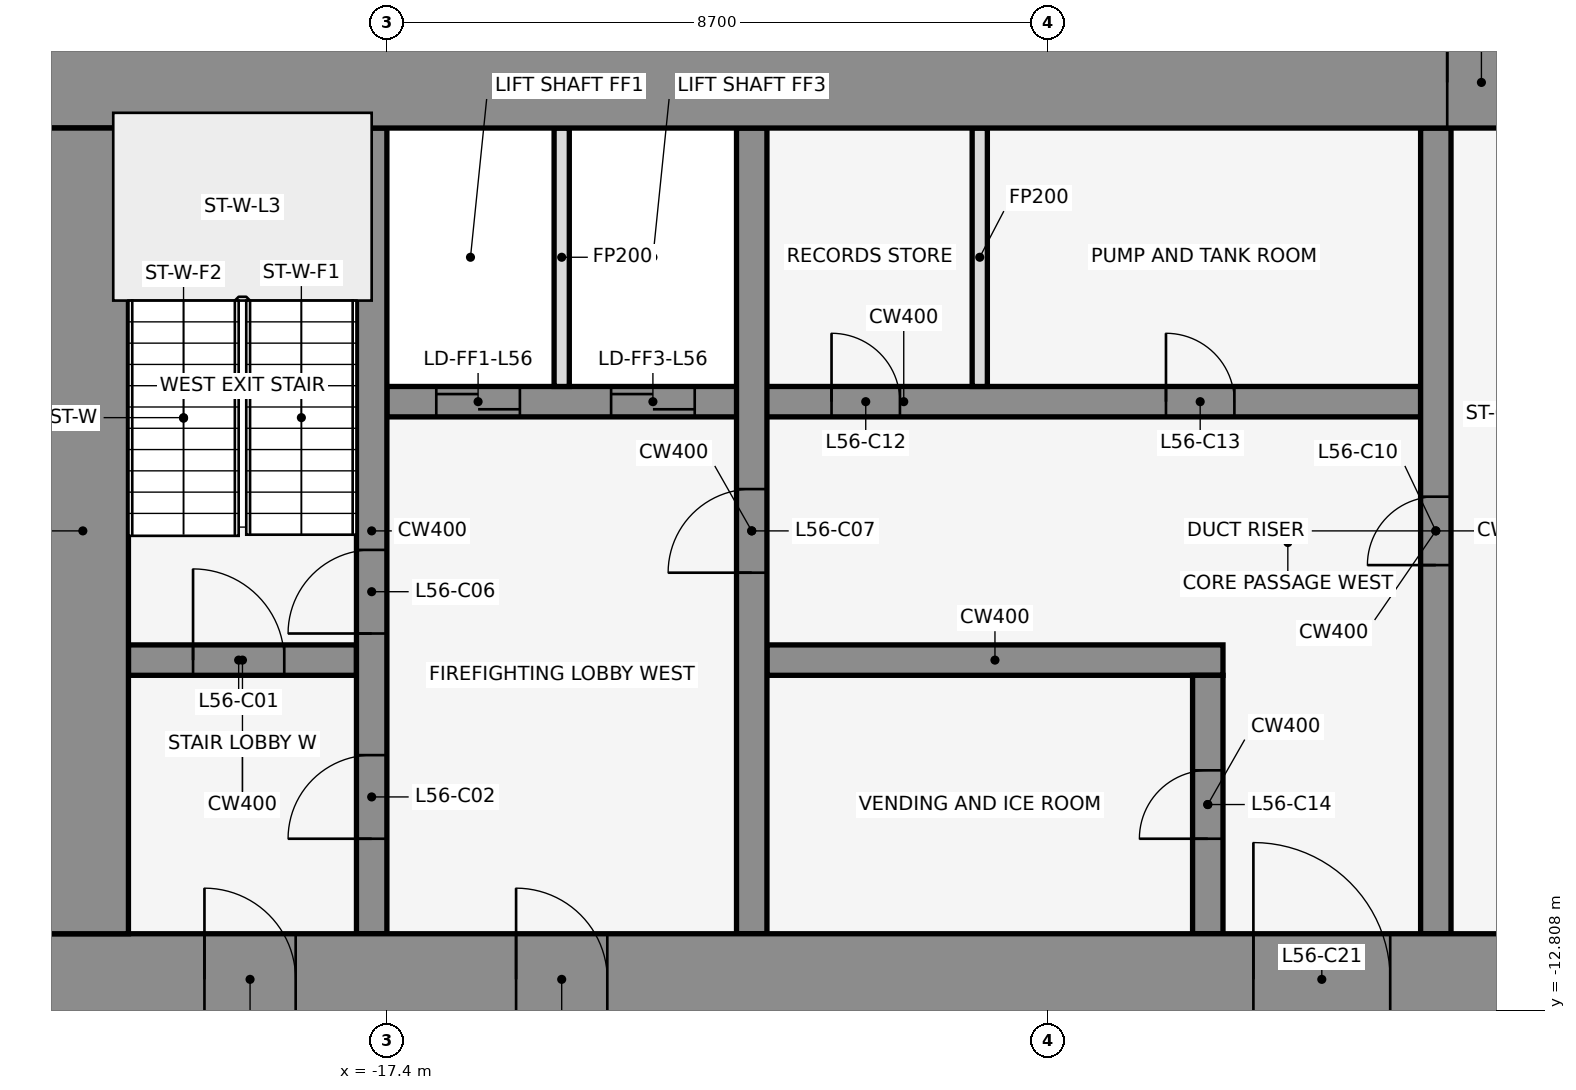
"""IFC4 building model, lengths in metres.
Left out: names, types, materials, properties, quantities, classifications, styles, units other than length and angle.
Written with IfcOpenShell. Run it as: python <this file> out.ifc"""

import sys

from ifc_helpers import new_model, si_unit, direction, frame, frame_2d, origin, place, context, subcontext, project, spatial, rectangle, extrude, element, fill, save


model = new_model("IFC4")
c1 = context("Model", 3, precision=1e-05, world=origin(), true_north=direction((0.0, 1.0)))
c2 = subcontext(c1, "Body", "Model", "MODEL_VIEW")
j1 = project(units=[si_unit("LENGTHUNIT", "METRE"), si_unit("PLANEANGLEUNIT", "RADIAN")], contexts=[c1])
p1 = place(None, origin())
s1 = spatial("IfcSite", under=j1, at=p1, CompositionType="ELEMENT")
p2 = place(p1, origin())
s2 = spatial("IfcBuilding", under=s1, at=p2, CompositionType="ELEMENT")
p3 = place(p2, frame((0.0, 0.0, 249.8)))
s3 = spatial("IfcBuildingStorey", under=s2, at=p3, CompositionType="ELEMENT", Elevation=249.8)
p4 = place(p3, frame((-14.599, 1.08, 0.0), z_axis=(0.0, 0.0, 1.0), x_axis=(-0.83981312244, -0.542875602121, 0.0)))
e1 = element("IfcWall", 1, at=p4, inside=s3, PredefinedType="STANDARD", context=c2, shape_type="SweptSolid", body=[
    extrude(rectangle(XDim=2.183, YDim=0.25, at=frame_2d((1.091, 0.0))), origin(), (0.0, 0.0, 1.0), 4.05),
])
p5 = place(p3, frame((-20.8, -8.2, 0.0), z_axis=(0.0, 0.0, 1.0), x_axis=(1.0, 0.0, 0.0)))
e2 = element("IfcWall", 2, at=p5, inside=s3, PredefinedType="SHEAR", context=c2, shape_type="SweptSolid", body=[
    extrude(rectangle(XDim=3.0, YDim=0.4, at=frame_2d((1.5, 0.0))), origin(), (0.0, 0.0, 1.0), 4.2),
])
p6 = place(p5, frame((0.85, 0.0, 0.0)))
e3 = element("IfcOpeningElement", 3, at=p6, cuts=e2, PredefinedType="OPENING", context=c2, shape_type="SweptSolid", body=[
    extrude(rectangle(XDim=1.2, YDim=2.1, at=frame_2d((0.6, 1.05))), frame((0.0, 0.212, 0.0), z_axis=(0.0, -1.0, 0.0), x_axis=(1.0, 0.0, 0.0)), (0.0, 0.0, 1.0), 0.424),
])
p7 = place(p3, frame((-12.4, -8.2, 0.0), z_axis=(0.0, 0.0, 1.0), x_axis=(1.0, 0.0, 0.0)))
e4 = element("IfcWall", 4, at=p7, inside=s3, PredefinedType="SHEAR", context=c2, shape_type="SweptSolid", body=[
    extrude(rectangle(XDim=6.0, YDim=0.4, at=frame_2d((3.0, 0.0))), origin(), (0.0, 0.0, 1.0), 4.2),
])
p8 = place(p3, frame((-17.4, -4.8, 0.0), z_axis=(0.0, 0.0, 1.0), x_axis=(1.0, 0.0, 0.0)))
e5 = element("IfcWall", 5, at=p8, inside=s3, PredefinedType="SHEAR", context=c2, shape_type="SweptSolid", body=[
    extrude(rectangle(XDim=13.6, YDim=0.4, at=frame_2d((6.8, 0.0))), origin(), (0.0, 0.0, 1.0), 4.2),
])
p9 = place(p8, frame((0.65, 0.0, 0.0)))
e6 = element("IfcOpeningElement", 6, at=p9, cuts=e5, PredefinedType="OPENING", context=c2, shape_type="SweptSolid", body=[
    extrude(rectangle(XDim=1.1, YDim=2.1, at=frame_2d((0.55, 1.05))), frame((0.0, 0.212, 0.0), z_axis=(0.0, -1.0, 0.0), x_axis=(1.0, 0.0, 0.0)), (0.0, 0.0, 1.0), 0.424),
])
p10 = place(p8, frame((2.95, 0.0, 0.0)))
e7 = element("IfcOpeningElement", 7, at=p10, cuts=e5, PredefinedType="OPENING", context=c2, shape_type="SweptSolid", body=[
    extrude(rectangle(XDim=1.1, YDim=2.1, at=frame_2d((0.55, 1.05))), frame((0.0, 0.212, 0.0), z_axis=(0.0, -1.0, 0.0), x_axis=(1.0, 0.0, 0.0)), (0.0, 0.0, 1.0), 0.424),
])
p11 = place(p8, frame((5.85, 0.0, 0.0)))
e8 = element("IfcOpeningElement", 8, at=p11, cuts=e5, PredefinedType="OPENING", context=c2, shape_type="SweptSolid", body=[
    extrude(rectangle(XDim=0.9, YDim=2.1, at=frame_2d((0.45, 1.05))), frame((0.0, 0.212, 0.0), z_axis=(0.0, -1.0, 0.0), x_axis=(1.0, 0.0, 0.0)), (0.0, 0.0, 1.0), 0.424),
])
p12 = place(p8, frame((10.25, 0.0, 0.0)))
e9 = element("IfcOpeningElement", 9, at=p12, cuts=e5, PredefinedType="OPENING", context=c2, shape_type="SweptSolid", body=[
    extrude(rectangle(XDim=0.9, YDim=2.1, at=frame_2d((0.45, 1.05))), frame((0.0, 0.212, 0.0), z_axis=(0.0, -1.0, 0.0), x_axis=(1.0, 0.0, 0.0)), (0.0, 0.0, 1.0), 0.424),
])
p13 = place(p3, frame((-17.6, -11.8, 0.0), z_axis=(0.0, 0.0, 1.0), x_axis=(0.0, 1.0, 0.0)))
e10 = element("IfcWall", 10, at=p13, inside=s3, PredefinedType="SHEAR", context=c2, shape_type="SweptSolid", body=[
    extrude(rectangle(XDim=10.6, YDim=0.4, at=frame_2d((5.3, 0.0))), origin(), (0.0, 0.0, 1.0), 4.2),
])
p14 = place(p13, frame((1.25, 0.0, 0.0)))
e11 = element("IfcOpeningElement", 11, at=p14, cuts=e10, PredefinedType="OPENING", context=c2, shape_type="SweptSolid", body=[
    extrude(rectangle(XDim=1.1, YDim=2.1, at=frame_2d((0.55, 1.05))), frame((0.0, 0.212, 0.0), z_axis=(0.0, -1.0, 0.0), x_axis=(1.0, 0.0, 0.0)), (0.0, 0.0, 1.0), 0.424),
])
p15 = place(p13, frame((3.95, 0.0, 0.0)))
e12 = element("IfcOpeningElement", 12, at=p15, cuts=e10, PredefinedType="OPENING", context=c2, shape_type="SweptSolid", body=[
    extrude(rectangle(XDim=1.1, YDim=2.1, at=frame_2d((0.55, 1.05))), frame((0.0, 0.212, 0.0), z_axis=(0.0, -1.0, 0.0), x_axis=(1.0, 0.0, 0.0)), (0.0, 0.0, 1.0), 0.424),
])
p16 = place(p3, frame((-15.1, -4.6, 0.0), z_axis=(0.0, 0.0, 1.0), x_axis=(0.0, 1.0, 0.0)))
e13 = element("IfcWall", 13, at=p16, inside=s3, PredefinedType="PARTITIONING", context=c2, shape_type="SweptSolid", body=[
    extrude(rectangle(XDim=3.4, YDim=0.2, at=frame_2d((1.7, 0.0))), origin(), (0.0, 0.0, 1.0), 3.039),
])
p17 = place(p3, frame((-12.6, -11.8, 0.0), z_axis=(0.0, 0.0, 1.0), x_axis=(0.0, 1.0, 0.0)))
e14 = element("IfcWall", 14, at=p17, inside=s3, PredefinedType="SHEAR", context=c2, shape_type="SweptSolid", body=[
    extrude(rectangle(XDim=10.6, YDim=0.4, at=frame_2d((5.3, 0.0))), origin(), (0.0, 0.0, 1.0), 4.2),
])
p18 = place(p17, frame((4.75, 0.0, 0.0)))
e15 = element("IfcOpeningElement", 15, at=p18, cuts=e14, PredefinedType="OPENING", context=c2, shape_type="SweptSolid", body=[
    extrude(rectangle(XDim=1.1, YDim=2.1, at=frame_2d((0.55, 1.05))), frame((0.0, 0.212, 0.0), z_axis=(0.0, -1.0, 0.0), x_axis=(1.0, 0.0, 0.0)), (0.0, 0.0, 1.0), 0.424),
])
p19 = place(p3, frame((-9.6, -4.6, 0.0), z_axis=(0.0, 0.0, 1.0), x_axis=(0.0, 1.0, 0.0)))
e16 = element("IfcWall", 16, at=p19, inside=s3, PredefinedType="PARTITIONING", context=c2, shape_type="SweptSolid", body=[
    extrude(rectangle(XDim=3.4, YDim=0.2, at=frame_2d((1.7, 0.0))), origin(), (0.0, 0.0, 1.0), 3.039),
])
p20 = place(p3, frame((-6.6, -11.8, 0.0), z_axis=(0.0, 0.0, 1.0), x_axis=(0.0, 1.0, 0.0)))
e17 = element("IfcWall", 17, at=p20, inside=s3, PredefinedType="SHEAR", context=c2, shape_type="SweptSolid", body=[
    extrude(rectangle(XDim=3.4, YDim=0.4, at=frame_2d((1.7, 0.0))), origin(), (0.0, 0.0, 1.0), 4.2),
])
p21 = place(p20, frame((1.25, 0.0, 0.0)))
e18 = element("IfcOpeningElement", 18, at=p21, cuts=e17, PredefinedType="OPENING", context=c2, shape_type="SweptSolid", body=[
    extrude(rectangle(XDim=0.9, YDim=2.1, at=frame_2d((0.45, 1.05))), frame((0.0, 0.212, 0.0), z_axis=(0.0, -1.0, 0.0), x_axis=(1.0, 0.0, 0.0)), (0.0, 0.0, 1.0), 0.424),
])
p22 = place(p3, frame((-3.6, -11.8, 0.0), z_axis=(0.0, 0.0, 1.0), x_axis=(0.0, 1.0, 0.0)))
e19 = element("IfcWall", 19, at=p22, inside=s3, PredefinedType="SHEAR", context=c2, shape_type="SweptSolid", body=[
    extrude(rectangle(XDim=10.6, YDim=0.4, at=frame_2d((5.3, 0.0))), origin(), (0.0, 0.0, 1.0), 4.2),
])
p23 = place(p22, frame((4.85, 0.0, 0.0)))
e20 = element("IfcOpeningElement", 20, at=p23, cuts=e19, PredefinedType="OPENING", context=c2, shape_type="SweptSolid", body=[
    extrude(rectangle(XDim=0.9, YDim=2.1, at=frame_2d((0.45, 1.05))), frame((0.0, 0.212, 0.0), z_axis=(0.0, -1.0, 0.0), x_axis=(1.0, 0.0, 0.0)), (0.0, 0.0, 1.0), 0.424),
])
p24 = place(p3, frame((-22.0, -0.6, 0.0), z_axis=(0.0, 0.0, 1.0), x_axis=(1.0, 0.0, 0.0)))
e21 = element("IfcWall", 21, at=p24, inside=s3, PredefinedType="SHEAR", context=c2, shape_type="SweptSolid", body=[
    extrude(rectangle(XDim=44.0, YDim=1.2, at=frame_2d((22.0, 0.0))), origin(), (0.0, 0.0, 1.0), 4.2),
])
p25 = place(p24, frame((18.55, 0.0, 0.0)))
e22 = element("IfcOpeningElement", 22, at=p25, cuts=e21, PredefinedType="OPENING", context=c2, shape_type="SweptSolid", body=[
    extrude(rectangle(XDim=0.9, YDim=2.1, at=frame_2d((0.45, 1.05))), frame((0.0, 0.612, 0.0), z_axis=(0.0, -1.0, 0.0), x_axis=(1.0, 0.0, 0.0)), (0.0, 0.0, 1.0), 1.224),
])
p26 = place(p24, frame((24.55, 0.0, 0.0)))
e23 = element("IfcOpeningElement", 23, at=p26, cuts=e21, PredefinedType="OPENING", context=c2, shape_type="SweptSolid", body=[
    extrude(rectangle(XDim=0.9, YDim=2.1, at=frame_2d((0.45, 1.05))), frame((0.0, 0.612, 0.0), z_axis=(0.0, -1.0, 0.0), x_axis=(1.0, 0.0, 0.0)), (0.0, 0.0, 1.0), 1.224),
])
p27 = place(p3, frame((-22.0, -12.4, 0.0), z_axis=(0.0, 0.0, 1.0), x_axis=(1.0, 0.0, 0.0)))
e24 = element("IfcWall", 24, at=p27, inside=s3, PredefinedType="SHEAR", context=c2, shape_type="SweptSolid", body=[
    extrude(rectangle(XDim=44.0, YDim=1.2, at=frame_2d((22.0, 0.0))), origin(), (0.0, 0.0, 1.0), 4.2),
])
p28 = place(p27, frame((2.2, 0.0, 0.0)))
e25 = element("IfcOpeningElement", 25, at=p28, cuts=e24, PredefinedType="OPENING", context=c2, shape_type="SweptSolid", body=[
    extrude(rectangle(XDim=1.2, YDim=2.1, at=frame_2d((0.6, 1.05))), frame((0.0, 0.612, 0.0), z_axis=(0.0, -1.0, 0.0), x_axis=(1.0, 0.0, 0.0)), (0.0, 0.0, 1.0), 1.224),
])
p29 = place(p27, frame((21.4, 0.0, 0.0)))
e26 = element("IfcOpeningElement", 26, at=p29, cuts=e24, PredefinedType="OPENING", context=c2, shape_type="SweptSolid", body=[
    extrude(rectangle(XDim=1.2, YDim=2.1, at=frame_2d((0.6, 1.05))), frame((0.0, 0.612, 0.0), z_axis=(0.0, -1.0, 0.0), x_axis=(1.0, 0.0, 0.0)), (0.0, 0.0, 1.0), 1.224),
])
p30 = place(p27, frame((40.6, 0.0, 0.0)))
e27 = element("IfcOpeningElement", 27, at=p30, cuts=e24, PredefinedType="OPENING", context=c2, shape_type="SweptSolid", body=[
    extrude(rectangle(XDim=1.2, YDim=2.1, at=frame_2d((0.6, 1.05))), frame((0.0, 0.612, 0.0), z_axis=(0.0, -1.0, 0.0), x_axis=(1.0, 0.0, 0.0)), (0.0, 0.0, 1.0), 1.224),
])
p31 = place(p27, frame((16.0, 0.0, 0.0)))
e28 = element("IfcOpeningElement", 28, at=p31, cuts=e24, PredefinedType="OPENING", context=c2, shape_type="SweptSolid", body=[
    extrude(rectangle(XDim=1.8, YDim=2.1, at=frame_2d((0.9, 1.05))), frame((0.0, 0.612, 0.0), z_axis=(0.0, -1.0, 0.0), x_axis=(1.0, 0.0, 0.0)), (0.0, 0.0, 1.0), 1.224),
])
p32 = place(p27, frame((6.3, 0.0, 0.0)))
e29 = element("IfcOpeningElement", 29, at=p32, cuts=e24, PredefinedType="OPENING", context=c2, shape_type="SweptSolid", body=[
    extrude(rectangle(XDim=1.2, YDim=2.1, at=frame_2d((0.6, 1.05))), frame((0.0, 0.612, 0.0), z_axis=(0.0, -1.0, 0.0), x_axis=(1.0, 0.0, 0.0)), (0.0, 0.0, 1.0), 1.224),
])
p33 = place(p27, frame((26.2, 0.0, 0.0)))
e30 = element("IfcOpeningElement", 30, at=p33, cuts=e24, PredefinedType="OPENING", context=c2, shape_type="SweptSolid", body=[
    extrude(rectangle(XDim=1.8, YDim=2.1, at=frame_2d((0.9, 1.05))), frame((0.0, 0.612, 0.0), z_axis=(0.0, -1.0, 0.0), x_axis=(1.0, 0.0, 0.0)), (0.0, 0.0, 1.0), 1.224),
])
p34 = place(p27, frame((36.5, 0.0, 0.0)))
e31 = element("IfcOpeningElement", 31, at=p34, cuts=e24, PredefinedType="OPENING", context=c2, shape_type="SweptSolid", body=[
    extrude(rectangle(XDim=1.2, YDim=2.1, at=frame_2d((0.6, 1.05))), frame((0.0, 0.612, 0.0), z_axis=(0.0, -1.0, 0.0), x_axis=(1.0, 0.0, 0.0)), (0.0, 0.0, 1.0), 1.224),
])
p35 = place(p3, frame((-21.4, -11.8, 0.0), z_axis=(0.0, 0.0, 1.0), x_axis=(0.0, 1.0, 0.0)))
e32 = element("IfcWall", 32, at=p35, inside=s3, PredefinedType="SHEAR", context=c2, shape_type="SweptSolid", body=[
    extrude(rectangle(XDim=10.6, YDim=1.2, at=frame_2d((5.3, 0.0))), origin(), (0.0, 0.0, 1.0), 4.2),
])
p36 = place(p6, origin())
e33 = element("IfcDoor", 33, at=p36, inside=s3, OperationType="SINGLE_SWING_LEFT", PredefinedType="DOOR", context=c2, shape_type="SweptSolid", body=[
    extrude(rectangle(XDim=1.2, YDim=2.1, at=frame_2d((0.6, 1.05))), frame((0.0, 0.025, 0.0), z_axis=(0.0, -1.0, 0.0), x_axis=(1.0, 0.0, 0.0)), (0.0, 0.0, 1.0), 0.05),
])
fill(e3, e33)
p37 = place(p14, frame((1.1, 0.0, 0.0), z_axis=(0.0, 0.0, 1.0), x_axis=(-1.0, 0.0, 0.0)))
e34 = element("IfcDoor", 34, at=p37, inside=s3, OperationType="SINGLE_SWING_LEFT", PredefinedType="DOOR", context=c2, shape_type="SweptSolid", body=[
    extrude(rectangle(XDim=1.1, YDim=2.1, at=frame_2d((0.55, 1.05))), frame((0.0, 0.025, 0.0), z_axis=(0.0, -1.0, 0.0), x_axis=(1.0, 0.0, 0.0)), (0.0, 0.0, 1.0), 0.05),
])
fill(e11, e34)
p38 = place(p9, origin())
e35 = element("IfcDoor", 35, at=p38, inside=s3, OperationType="DOUBLE_DOOR_SLIDING", PredefinedType="DOOR", context=c2, shape_type="SweptSolid", body=[
    extrude(rectangle(XDim=1.1, YDim=2.1, at=frame_2d((0.55, 1.05))), frame((0.0, 0.025, 0.0), z_axis=(0.0, -1.0, 0.0), x_axis=(1.0, 0.0, 0.0)), (0.0, 0.0, 1.0), 0.05),
])
fill(e6, e35)
p39 = place(p10, origin())
e36 = element("IfcDoor", 36, at=p39, inside=s3, OperationType="DOUBLE_DOOR_SLIDING", PredefinedType="DOOR", context=c2, shape_type="SweptSolid", body=[
    extrude(rectangle(XDim=1.1, YDim=2.1, at=frame_2d((0.55, 1.05))), frame((0.0, 0.025, 0.0), z_axis=(0.0, -1.0, 0.0), x_axis=(1.0, 0.0, 0.0)), (0.0, 0.0, 1.0), 0.05),
])
fill(e7, e36)
p40 = place(p15, frame((1.1, 0.0, 0.0), z_axis=(0.0, 0.0, 1.0), x_axis=(-1.0, 0.0, 0.0)))
e37 = element("IfcDoor", 37, at=p40, inside=s3, OperationType="SINGLE_SWING_LEFT", PredefinedType="DOOR", context=c2, shape_type="SweptSolid", body=[
    extrude(rectangle(XDim=1.1, YDim=2.1, at=frame_2d((0.55, 1.05))), frame((0.0, 0.025, 0.0), z_axis=(0.0, -1.0, 0.0), x_axis=(1.0, 0.0, 0.0)), (0.0, 0.0, 1.0), 0.05),
])
fill(e12, e37)
p41 = place(p18, origin())
e38 = element("IfcDoor", 38, at=p41, inside=s3, OperationType="SINGLE_SWING_LEFT", PredefinedType="DOOR", context=c2, shape_type="SweptSolid", body=[
    extrude(rectangle(XDim=1.1, YDim=2.1, at=frame_2d((0.55, 1.05))), frame((0.0, 0.025, 0.0), z_axis=(0.0, -1.0, 0.0), x_axis=(1.0, 0.0, 0.0)), (0.0, 0.0, 1.0), 0.05),
])
fill(e15, e38)
p42 = place(p23, frame((0.9, 0.0, 0.0), z_axis=(0.0, 0.0, 1.0), x_axis=(-1.0, 0.0, 0.0)))
e39 = element("IfcDoor", 39, at=p42, inside=s3, OperationType="SINGLE_SWING_LEFT", PredefinedType="DOOR", context=c2, shape_type="SweptSolid", body=[
    extrude(rectangle(XDim=0.9, YDim=2.1, at=frame_2d((0.45, 1.05))), frame((0.0, 0.025, 0.0), z_axis=(0.0, -1.0, 0.0), x_axis=(1.0, 0.0, 0.0)), (0.0, 0.0, 1.0), 0.05),
])
fill(e20, e39)
p43 = place(p11, origin())
e40 = element("IfcDoor", 40, at=p43, inside=s3, OperationType="SINGLE_SWING_RIGHT", PredefinedType="DOOR", context=c2, shape_type="SweptSolid", body=[
    extrude(rectangle(XDim=0.9, YDim=2.1, at=frame_2d((0.45, 1.05))), frame((0.0, 0.025, 0.0), z_axis=(0.0, -1.0, 0.0), x_axis=(1.0, 0.0, 0.0)), (0.0, 0.0, 1.0), 0.05),
])
fill(e8, e40)
p44 = place(p12, origin())
e41 = element("IfcDoor", 41, at=p44, inside=s3, OperationType="SINGLE_SWING_LEFT", PredefinedType="DOOR", context=c2, shape_type="SweptSolid", body=[
    extrude(rectangle(XDim=0.9, YDim=2.1, at=frame_2d((0.45, 1.05))), frame((0.0, 0.025, 0.0), z_axis=(0.0, -1.0, 0.0), x_axis=(1.0, 0.0, 0.0)), (0.0, 0.0, 1.0), 0.05),
])
fill(e9, e41)
p45 = place(p21, origin())
e42 = element("IfcDoor", 42, at=p45, inside=s3, OperationType="SINGLE_SWING_RIGHT", PredefinedType="DOOR", context=c2, shape_type="SweptSolid", body=[
    extrude(rectangle(XDim=0.9, YDim=2.1, at=frame_2d((0.45, 1.05))), frame((0.0, 0.025, 0.0), z_axis=(0.0, -1.0, 0.0), x_axis=(1.0, 0.0, 0.0)), (0.0, 0.0, 1.0), 0.05),
])
fill(e18, e42)
p46 = place(p25, origin())
e43 = element("IfcDoor", 43, at=p46, inside=s3, OperationType="SINGLE_SWING_LEFT", PredefinedType="DOOR", context=c2, shape_type="SweptSolid", body=[
    extrude(rectangle(XDim=0.9, YDim=2.1, at=frame_2d((0.45, 1.05))), frame((0.0, 0.025, 0.0), z_axis=(0.0, -1.0, 0.0), x_axis=(1.0, 0.0, 0.0)), (0.0, 0.0, 1.0), 0.05),
])
fill(e22, e43)
p47 = place(p28, frame((1.2, 0.0, 0.0), z_axis=(0.0, 0.0, 1.0), x_axis=(-1.0, 0.0, 0.0)))
e44 = element("IfcDoor", 44, at=p47, inside=s3, OperationType="SINGLE_SWING_RIGHT", PredefinedType="DOOR", context=c2, shape_type="SweptSolid", body=[
    extrude(rectangle(XDim=1.2, YDim=2.1, at=frame_2d((0.6, 1.05))), frame((0.0, 0.025, 0.0), z_axis=(0.0, -1.0, 0.0), x_axis=(1.0, 0.0, 0.0)), (0.0, 0.0, 1.0), 0.05),
])
fill(e25, e44)
p48 = place(p31, origin())
e45 = element("IfcDoor", 45, at=p48, inside=s3, OperationType="SINGLE_SWING_LEFT", PredefinedType="DOOR", context=c2, shape_type="SweptSolid", body=[
    extrude(rectangle(XDim=1.8, YDim=2.1, at=frame_2d((0.9, 1.05))), frame((0.0, 0.025, 0.0), z_axis=(0.0, -1.0, 0.0), x_axis=(1.0, 0.0, 0.0)), (0.0, 0.0, 1.0), 0.05),
])
fill(e28, e45)
p49 = place(p32, frame((1.2, 0.0, 0.0), z_axis=(0.0, 0.0, 1.0), x_axis=(-1.0, 0.0, 0.0)))
e46 = element("IfcDoor", 46, at=p49, inside=s3, OperationType="SINGLE_SWING_RIGHT", PredefinedType="DOOR", context=c2, shape_type="SweptSolid", body=[
    extrude(rectangle(XDim=1.2, YDim=2.1, at=frame_2d((0.6, 1.05))), frame((0.0, 0.025, 0.0), z_axis=(0.0, -1.0, 0.0), x_axis=(1.0, 0.0, 0.0)), (0.0, 0.0, 1.0), 0.05),
])
fill(e29, e46)
save(model, sys.argv[1])
